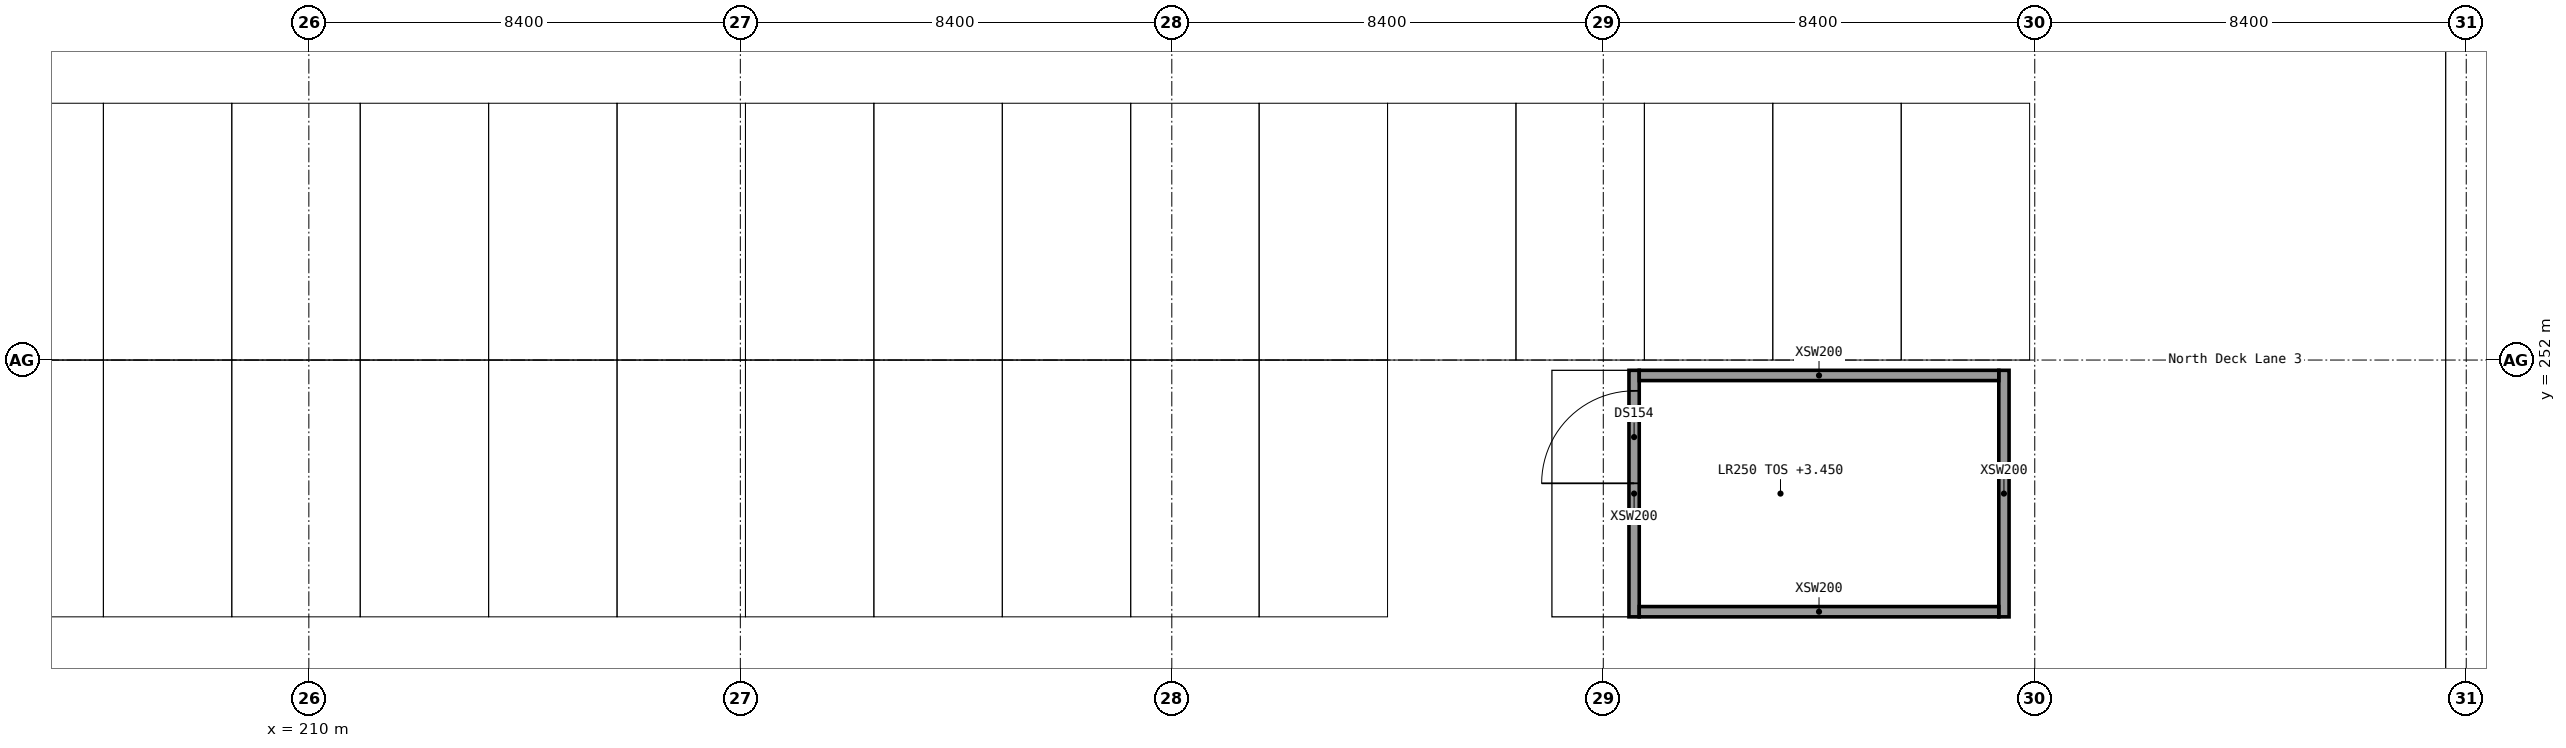
"""IFC4 building model, lengths in metres.
Left out: names, types, materials, properties, quantities, classifications, styles, units other than length and angle.
Written with IfcOpenShell. Run it as: python <this file> out.ifc"""

import sys

from ifc_helpers import new_model, si_unit, direction, frame, frame_2d, origin, place, context, subcontext, project, spatial, rectangle, extrude, element, fill, save


model = new_model("IFC4")
c1 = context("Model", 3, precision=1e-05, world=origin(), true_north=direction((0.0, 1.0)))
c2 = subcontext(c1, "Body", "Model", "MODEL_VIEW")
j1 = project(units=[si_unit("LENGTHUNIT", "METRE"), si_unit("PLANEANGLEUNIT", "RADIAN")], contexts=[c1])
p1 = place(None, origin())
s1 = spatial("IfcSite", under=j1, at=p1, CompositionType="ELEMENT")
p2 = place(p1, origin())
s2 = spatial("IfcBuilding", under=s1, at=p2, CompositionType="ELEMENT")
p3 = place(p2, origin())
s3 = spatial("IfcBuildingStorey", under=s2, at=p3, CompositionType="ELEMENT", Elevation=0.0)
p4 = place(p3, frame((235.8, 247.0, 0.0), z_axis=(0.0, 0.0, 1.0), x_axis=(0.0, 1.0, 0.0)))
e1 = element("IfcWall", 1, at=p4, inside=s3, PredefinedType="SOLIDWALL", context=c2, shape_type="SweptSolid", body=[
    extrude(rectangle(XDim=4.8, YDim=0.2, at=frame_2d((2.4, 0.0))), origin(), (0.0, 0.0, 1.0), 3.2),
])
p5 = place(p4, frame((2.6, 0.0, 0.0)))
e2 = element("IfcOpeningElement", 2, at=p5, cuts=e1, PredefinedType="OPENING", context=c2, shape_type="SweptSolid", body=[
    extrude(rectangle(XDim=1.8, YDim=2.1, at=frame_2d((0.9, 1.05))), frame((0.0, 0.1, 0.0), z_axis=(0.0, -1.0, 0.0), x_axis=(1.0, 0.0, 0.0)), (0.0, 0.0, 1.0), 0.2),
])
p6 = place(p3, frame((243.0, 247.0, 0.0), z_axis=(0.0, 0.0, 1.0), x_axis=(0.0, 1.0, 0.0)))
e3 = element("IfcWall", 3, at=p6, inside=s3, PredefinedType="SOLIDWALL", context=c2, shape_type="SweptSolid", body=[
    extrude(rectangle(XDim=4.8, YDim=0.2, at=frame_2d((2.4, 0.0))), origin(), (0.0, 0.0, 1.0), 3.2),
])
for number, where, z_axis, x_axis in (
    (4, (235.9, 247.1, 0.0), (0.0, 0.0, 1.0), (1.0, 0.0, 0.0)),
    (5, (235.9, 251.7, 0.0), (0.0, 0.0, 1.0), (1.0, 0.0, 0.0)),
):
    element("IfcWall", number, at=place(p3, frame(where, z_axis=z_axis, x_axis=x_axis)), inside=s3, PredefinedType="SOLIDWALL", context=c2, shape_type="SweptSolid", body=[
        extrude(rectangle(XDim=7.0, YDim=0.2, at=frame_2d((3.5, 0.0))), origin(), (0.0, 0.0, 1.0), 3.2),
    ])
p7 = place(p5, origin())
e6 = element("IfcDoor", 6, at=p7, inside=s3, OperationType="SINGLE_SWING_LEFT", PredefinedType="DOOR", context=c2, shape_type="SweptSolid", body=[
    extrude(rectangle(XDim=1.8, YDim=2.1, at=frame_2d((0.9, 1.05))), frame((0.0, 0.025, 0.0), z_axis=(0.0, -1.0, 0.0), x_axis=(1.0, 0.0, 0.0)), (0.0, 0.0, 1.0), 0.05),
])
fill(e2, e6)
save(model, sys.argv[1])
